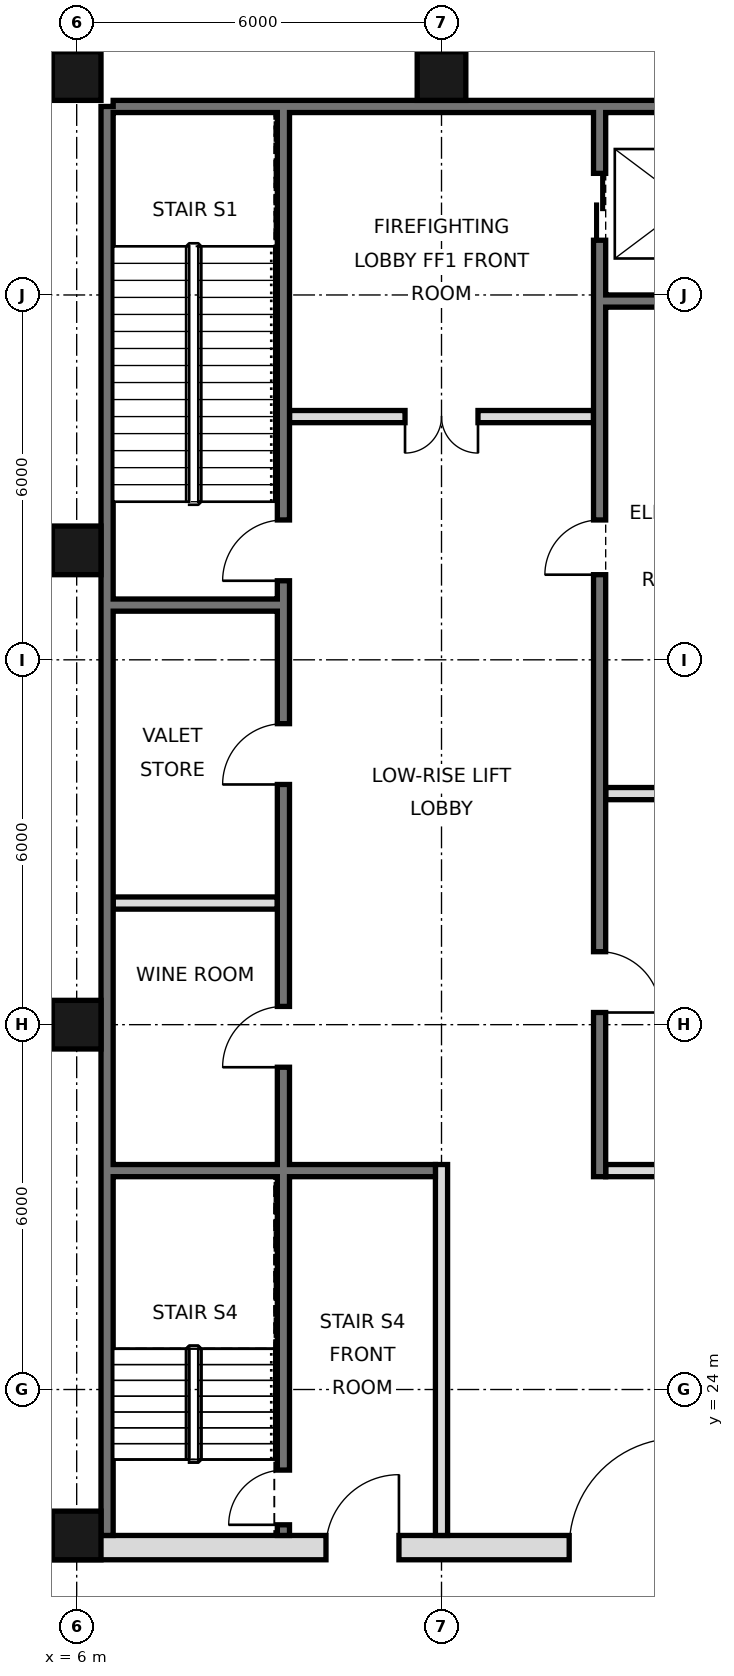
"""IFC4 building model, lengths in metres.
Left out: names, types, materials, properties, quantities, classifications, styles, units other than length and angle.
Written with IfcOpenShell. Run it as: python <this file> out.ifc"""

import sys

from ifc_helpers import new_model, si_unit, direction, frame, frame_2d, origin, origin_2d, place, context, subcontext, project, spatial, rectangle, hollow_rectangle, extrude, element, fill, save


model = new_model("IFC4")
c1 = context("Model", 3, precision=1e-05, world=origin(), true_north=direction((0.0, 1.0)))
c2 = subcontext(c1, "Body", "Model", "MODEL_VIEW")
j1 = project(units=[si_unit("LENGTHUNIT", "METRE"), si_unit("PLANEANGLEUNIT", "RADIAN")], contexts=[c1])
p1 = place(None, origin())
s1 = spatial("IfcSite", under=j1, at=p1, CompositionType="ELEMENT")
p2 = place(p1, origin())
s2 = spatial("IfcBuilding", under=s1, at=p2, CompositionType="ELEMENT")
p3 = place(p2, frame((0.0, 0.0, 257.6)))
s3 = spatial("IfcBuildingStorey", under=s2, at=p3, CompositionType="ELEMENT", Elevation=257.6)
for number, where, z_axis, x_axis in (
    (1, (6.0, 21.6, 0.0), (0.0, 0.0, 1.0), (1.0, 0.0, 0.0)),
    (2, (6.0, 30.0, 0.0), (0.0, 0.0, 1.0), (1.0, 0.0, 0.0)),
    (3, (6.0, 37.8, 0.0), (0.0, 0.0, 1.0), (1.0, 0.0, 0.0)),
    (4, (6.0, 45.6, 0.0), (0.0, 0.0, 1.0), (1.0, 0.0, 0.0)),
    (5, (12.0, 45.6, 0.0), (0.0, 0.0, 1.0), (1.0, 0.0, 0.0)),
):
    element("IfcColumn", number, at=place(p3, frame(where, z_axis=z_axis, x_axis=x_axis)), inside=s3, PredefinedType="COLUMN", context=c2, shape_type="SweptSolid", body=[
        extrude(hollow_rectangle(XDim=0.8, YDim=0.8, WallThickness=0.032, at=origin_2d()), origin(), (0.0, 0.0, 1.0), 5.4),
    ])
p4 = place(p3, frame((6.5, 21.6, 0.0), z_axis=(0.0, 0.0, 1.0), x_axis=(0.0, 1.0, 0.0)))
e6 = element("IfcWall", 6, at=p4, inside=s3, PredefinedType="SOLIDWALL", context=c2, shape_type="SweptSolid", body=[
    extrude(rectangle(XDim=23.5, YDim=0.2, at=frame_2d((11.75, 0.0))), origin(), (0.0, 0.0, 1.0), 5.22),
])
p5 = place(p3, frame((6.6, 45.1, 0.0), z_axis=(0.0, 0.0, 1.0), x_axis=(1.0, 0.0, 0.0)))
e7 = element("IfcWall", 7, at=p5, inside=s3, PredefinedType="SOLIDWALL", context=c2, shape_type="SweptSolid", body=[
    extrude(rectangle(XDim=34.8, YDim=0.2, at=frame_2d((17.4, 0.0))), origin(), (0.0, 0.0, 1.0), 5.22),
])
p6 = place(p3, frame((5.6, 21.4, 0.0), z_axis=(0.0, 0.0, 1.0), x_axis=(1.0, 0.0, 0.0)))
e8 = element("IfcWall", 8, at=p6, inside=s3, PredefinedType="SOLIDWALL", context=c2, shape_type="SweptSolid", body=[
    extrude(rectangle(XDim=36.8, YDim=0.4, at=frame_2d((18.4, 0.0))), origin(), (0.0, 0.0, 1.0), 5.22),
])
p7 = place(p6, frame((8.5, 0.0, 0.0)))
e9 = element("IfcOpeningElement", 9, at=p7, cuts=e8, PredefinedType="OPENING", context=c2, shape_type="SweptSolid", body=[
    extrude(rectangle(XDim=1.8, YDim=2.1, at=frame_2d((0.9, 1.05))), frame((0.0, 0.21, 0.0), z_axis=(0.0, -1.0, 0.0), x_axis=(1.0, 0.0, 0.0)), (0.0, 0.0, 1.0), 0.42),
])
p8 = place(p6, frame((17.5, 0.0, 0.0)))
e10 = element("IfcOpeningElement", 10, at=p8, cuts=e8, PredefinedType="OPENING", context=c2, shape_type="SweptSolid", body=[
    extrude(rectangle(XDim=1.8, YDim=2.1, at=frame_2d((0.9, 1.05))), frame((0.0, 0.21, 0.0), z_axis=(0.0, -1.0, 0.0), x_axis=(1.0, 0.0, 0.0)), (0.0, 0.0, 1.0), 0.42),
])
p9 = place(p6, frame((26.5, 0.0, 0.0)))
e11 = element("IfcOpeningElement", 11, at=p9, cuts=e8, PredefinedType="OPENING", context=c2, shape_type="SweptSolid", body=[
    extrude(rectangle(XDim=1.8, YDim=2.1, at=frame_2d((0.9, 1.05))), frame((0.0, 0.21, 0.0), z_axis=(0.0, -1.0, 0.0), x_axis=(1.0, 0.0, 0.0)), (0.0, 0.0, 1.0), 0.42),
])
p10 = place(p6, frame((4.5, 0.0, 0.0)))
e12 = element("IfcOpeningElement", 12, at=p10, cuts=e8, PredefinedType="OPENING", context=c2, shape_type="SweptSolid", body=[
    extrude(rectangle(XDim=1.2, YDim=2.1, at=frame_2d((0.6, 1.05))), frame((0.0, 0.21, 0.0), z_axis=(0.0, -1.0, 0.0), x_axis=(1.0, 0.0, 0.0)), (0.0, 0.0, 1.0), 0.42),
])
p11 = place(p6, frame((31.1, 0.0, 0.0)))
e13 = element("IfcOpeningElement", 13, at=p11, cuts=e8, PredefinedType="OPENING", context=c2, shape_type="SweptSolid", body=[
    extrude(rectangle(XDim=1.2, YDim=2.1, at=frame_2d((0.6, 1.05))), frame((0.0, 0.21, 0.0), z_axis=(0.0, -1.0, 0.0), x_axis=(1.0, 0.0, 0.0)), (0.0, 0.0, 1.0), 0.42),
])
p12 = place(p3, frame((12.0, 21.6, 0.0), z_axis=(0.0, 0.0, 1.0), x_axis=(0.0, 1.0, 0.0)))
e14 = element("IfcWall", 14, at=p12, inside=s3, PredefinedType="PARTITIONING", context=c2, shape_type="SweptSolid", body=[
    extrude(rectangle(XDim=6.1, YDim=0.2, at=frame_2d((3.05, 0.0))), origin(), (0.0, 0.0, 1.0), 5.22),
])
p13 = place(p3, frame((14.6, 27.5, 0.0), z_axis=(0.0, 0.0, 1.0), x_axis=(0.0, 1.0, 0.0)))
e15 = element("IfcWall", 15, at=p13, inside=s3, PredefinedType="SOLIDWALL", context=c2, shape_type="SweptSolid", body=[
    extrude(rectangle(XDim=17.5, YDim=0.2, at=frame_2d((8.75, 0.0))), origin(), (0.0, 0.0, 1.0), 5.22),
])
p14 = place(p13, frame((15.4, 0.0, 0.0)))
e16 = element("IfcOpeningElement", 16, at=p14, cuts=e15, PredefinedType="OPENING", context=c2, shape_type="SweptSolid", body=[
    extrude(rectangle(XDim=1.1, YDim=2.1, at=frame_2d((0.55, 1.05))), frame((0.0, 0.11, 0.0), z_axis=(0.0, -1.0, 0.0), x_axis=(1.0, 0.0, 0.0)), (0.0, 0.0, 1.0), 0.22),
])
p15 = place(p13, frame((2.7, 0.0, 0.0)))
e17 = element("IfcOpeningElement", 17, at=p15, cuts=e15, PredefinedType="OPENING", context=c2, shape_type="SweptSolid", body=[
    extrude(rectangle(XDim=1.0, YDim=2.1, at=frame_2d((0.5, 1.05))), frame((0.0, 0.11, 0.0), z_axis=(0.0, -1.0, 0.0), x_axis=(1.0, 0.0, 0.0)), (0.0, 0.0, 1.0), 0.22),
])
p16 = place(p13, frame((9.9, 0.0, 0.0)))
e18 = element("IfcOpeningElement", 18, at=p16, cuts=e15, PredefinedType="OPENING", context=c2, shape_type="SweptSolid", body=[
    extrude(rectangle(XDim=0.9, YDim=2.1, at=frame_2d((0.45, 1.05))), frame((0.0, 0.11, 0.0), z_axis=(0.0, -1.0, 0.0), x_axis=(1.0, 0.0, 0.0)), (0.0, 0.0, 1.0), 0.22),
])
p17 = place(p3, frame((9.4, 21.6, 0.0), z_axis=(0.0, 0.0, 1.0), x_axis=(0.0, 1.0, 0.0)))
e19 = element("IfcWall", 19, at=p17, inside=s3, PredefinedType="SOLIDWALL", context=c2, shape_type="SweptSolid", body=[
    extrude(rectangle(XDim=23.4, YDim=0.2, at=frame_2d((11.7, 0.0))), origin(), (0.0, 0.0, 1.0), 5.22),
])
p18 = place(p17, frame((7.7, 0.0, 0.0)))
e20 = element("IfcOpeningElement", 20, at=p18, cuts=e19, PredefinedType="OPENING", context=c2, shape_type="SweptSolid", body=[
    extrude(rectangle(XDim=1.0, YDim=2.1, at=frame_2d((0.5, 1.05))), frame((0.0, 0.11, 0.0), z_axis=(0.0, -1.0, 0.0), x_axis=(1.0, 0.0, 0.0)), (0.0, 0.0, 1.0), 0.22),
])
p19 = place(p17, frame((12.35, 0.0, 0.0)))
e21 = element("IfcOpeningElement", 21, at=p19, cuts=e19, PredefinedType="OPENING", context=c2, shape_type="SweptSolid", body=[
    extrude(rectangle(XDim=1.0, YDim=2.1, at=frame_2d((0.5, 1.05))), frame((0.0, 0.11, 0.0), z_axis=(0.0, -1.0, 0.0), x_axis=(1.0, 0.0, 0.0)), (0.0, 0.0, 1.0), 0.22),
])
p20 = place(p17, frame((15.7, 0.0, 0.0)))
e22 = element("IfcOpeningElement", 22, at=p20, cuts=e19, PredefinedType="OPENING", context=c2, shape_type="SweptSolid", body=[
    extrude(rectangle(XDim=1.0, YDim=2.1, at=frame_2d((0.5, 1.05))), frame((0.0, 0.11, 0.0), z_axis=(0.0, -1.0, 0.0), x_axis=(1.0, 0.0, 0.0)), (0.0, 0.0, 1.0), 0.22),
])
p21 = place(p17, frame((0.175, 0.0, 0.0)))
e23 = element("IfcOpeningElement", 23, at=p21, cuts=e19, PredefinedType="OPENING", context=c2, shape_type="SweptSolid", body=[
    extrude(rectangle(XDim=0.9, YDim=2.1, at=frame_2d((0.45, 1.05))), frame((0.0, 0.11, 0.0), z_axis=(0.0, -1.0, 0.0), x_axis=(1.0, 0.0, 0.0)), (0.0, 0.0, 1.0), 0.22),
])
p22 = place(p3, frame((14.7, 27.6, 0.0), z_axis=(0.0, 0.0, 1.0), x_axis=(1.0, 0.0, 0.0)))
e24 = element("IfcWall", 24, at=p22, inside=s3, PredefinedType="PARTITIONING", context=c2, shape_type="SweptSolid", body=[
    extrude(rectangle(XDim=2.7, YDim=0.2, at=frame_2d((1.35, 0.0))), origin(), (0.0, 0.0, 1.0), 5.22),
])
p23 = place(p3, frame((6.6, 27.6, 0.0), z_axis=(0.0, 0.0, 1.0), x_axis=(1.0, 0.0, 0.0)))
e25 = element("IfcWall", 25, at=p23, inside=s3, PredefinedType="SOLIDWALL", context=c2, shape_type="SweptSolid", body=[
    extrude(rectangle(XDim=5.3, YDim=0.2, at=frame_2d((2.65, 0.0))), origin(), (0.0, 0.0, 1.0), 5.22),
])
p24 = place(p3, frame((6.6, 32.0, 0.0), z_axis=(0.0, 0.0, 1.0), x_axis=(1.0, 0.0, 0.0)))
e26 = element("IfcWall", 26, at=p24, inside=s3, PredefinedType="PARTITIONING", context=c2, shape_type="SweptSolid", body=[
    extrude(rectangle(XDim=2.7, YDim=0.2, at=frame_2d((1.35, 0.0))), origin(), (0.0, 0.0, 1.0), 5.22),
])
for number, where, z_axis, x_axis in (
    (27, (14.7, 33.8, 0.0), (0.0, 0.0, 1.0), (1.0, 0.0, 0.0)),
    (28, (6.6, 36.9, 0.0), (0.0, 0.0, 1.0), (1.0, 0.0, 0.0)),
):
    element("IfcWall", number, at=place(p3, frame(where, z_axis=z_axis, x_axis=x_axis)), inside=s3, PredefinedType="SOLIDWALL", context=c2, shape_type="SweptSolid", body=[
        extrude(rectangle(XDim=2.7, YDim=0.2, at=frame_2d((1.35, 0.0))), origin(), (0.0, 0.0, 1.0), 5.22),
    ])
p25 = place(p3, frame((9.5, 40.0, 0.0), z_axis=(0.0, 0.0, 1.0), x_axis=(1.0, 0.0, 0.0)))
e29 = element("IfcWall", 29, at=p25, inside=s3, PredefinedType="PARTITIONING", context=c2, shape_type="SweptSolid", body=[
    extrude(rectangle(XDim=5.0, YDim=0.2, at=frame_2d((2.5, 0.0))), origin(), (0.0, 0.0, 1.0), 5.22),
])
p26 = place(p25, frame((1.9, 0.0, 0.0)))
e30 = element("IfcOpeningElement", 30, at=p26, cuts=e29, PredefinedType="OPENING", context=c2, shape_type="SweptSolid", body=[
    extrude(rectangle(XDim=1.2, YDim=2.1, at=frame_2d((0.6, 1.05))), frame((0.0, 0.11, 0.0), z_axis=(0.0, -1.0, 0.0), x_axis=(1.0, 0.0, 0.0)), (0.0, 0.0, 1.0), 0.22),
])
p27 = place(p3, frame((14.7, 41.9, 0.0), z_axis=(0.0, 0.0, 1.0), x_axis=(1.0, 0.0, 0.0)))
e31 = element("IfcWall", 31, at=p27, inside=s3, PredefinedType="SOLIDWALL", context=c2, shape_type="SweptSolid", body=[
    extrude(rectangle(XDim=2.7, YDim=0.2, at=frame_2d((1.35, 0.0))), origin(), (0.0, 0.0, 1.0), 5.22),
])
p28 = place(p7, frame((1.8, 0.0, 0.0), z_axis=(0.0, 0.0, 1.0), x_axis=(-1.0, 0.0, 0.0)))
e32 = element("IfcDoor", 32, at=p28, inside=s3, OperationType="SINGLE_SWING_LEFT", PredefinedType="DOOR", context=c2, shape_type="SweptSolid", body=[
    extrude(rectangle(XDim=1.8, YDim=2.1, at=frame_2d((0.9, 1.05))), frame((0.0, 0.025, 0.0), z_axis=(0.0, -1.0, 0.0), x_axis=(1.0, 0.0, 0.0)), (0.0, 0.0, 1.0), 0.05),
])
fill(e9, e32)
p29 = place(p10, frame((1.2, 0.0, 0.0), z_axis=(0.0, 0.0, 1.0), x_axis=(-1.0, 0.0, 0.0)))
e33 = element("IfcDoor", 33, at=p29, inside=s3, OperationType="SINGLE_SWING_LEFT", PredefinedType="DOOR", context=c2, shape_type="SweptSolid", body=[
    extrude(rectangle(XDim=1.2, YDim=2.1, at=frame_2d((0.6, 1.05))), frame((0.0, 0.025, 0.0), z_axis=(0.0, -1.0, 0.0), x_axis=(1.0, 0.0, 0.0)), (0.0, 0.0, 1.0), 0.05),
])
fill(e12, e33)
p30 = place(p26, frame((1.2, 0.0, 0.0), z_axis=(0.0, 0.0, 1.0), x_axis=(-1.0, 0.0, 0.0)))
e34 = element("IfcDoor", 34, at=p30, inside=s3, OperationType="DOUBLE_DOOR_SINGLE_SWING", PredefinedType="DOOR", context=c2, shape_type="SweptSolid", body=[
    extrude(rectangle(XDim=1.2, YDim=2.1, at=frame_2d((0.6, 1.05))), frame((0.0, 0.025, 0.0), z_axis=(0.0, -1.0, 0.0), x_axis=(1.0, 0.0, 0.0)), (0.0, 0.0, 1.0), 0.05),
])
fill(e30, e34)
p31 = place(p14, origin())
e35 = element("IfcDoor", 35, at=p31, inside=s3, OperationType="DOUBLE_DOOR_SLIDING", PredefinedType="DOOR", context=c2, shape_type="SweptSolid", body=[
    extrude(rectangle(XDim=1.1, YDim=2.1, at=frame_2d((0.55, 1.05))), frame((0.0, 0.025, 0.0), z_axis=(0.0, -1.0, 0.0), x_axis=(1.0, 0.0, 0.0)), (0.0, 0.0, 1.0), 0.05),
])
fill(e16, e35)
p32 = place(p15, frame((1.0, 0.0, 0.0), z_axis=(0.0, 0.0, 1.0), x_axis=(-1.0, 0.0, 0.0)))
e36 = element("IfcDoor", 36, at=p32, inside=s3, OperationType="SINGLE_SWING_RIGHT", PredefinedType="DOOR", context=c2, shape_type="SweptSolid", body=[
    extrude(rectangle(XDim=1.0, YDim=2.1, at=frame_2d((0.5, 1.05))), frame((0.0, 0.025, 0.0), z_axis=(0.0, -1.0, 0.0), x_axis=(1.0, 0.0, 0.0)), (0.0, 0.0, 1.0), 0.05),
])
fill(e17, e36)
p33 = place(p18, origin())
e37 = element("IfcDoor", 37, at=p33, inside=s3, OperationType="SINGLE_SWING_LEFT", PredefinedType="DOOR", context=c2, shape_type="SweptSolid", body=[
    extrude(rectangle(XDim=1.0, YDim=2.1, at=frame_2d((0.5, 1.05))), frame((0.0, 0.025, 0.0), z_axis=(0.0, -1.0, 0.0), x_axis=(1.0, 0.0, 0.0)), (0.0, 0.0, 1.0), 0.05),
])
fill(e20, e37)
p34 = place(p19, origin())
e38 = element("IfcDoor", 38, at=p34, inside=s3, OperationType="SINGLE_SWING_LEFT", PredefinedType="DOOR", context=c2, shape_type="SweptSolid", body=[
    extrude(rectangle(XDim=1.0, YDim=2.1, at=frame_2d((0.5, 1.05))), frame((0.0, 0.025, 0.0), z_axis=(0.0, -1.0, 0.0), x_axis=(1.0, 0.0, 0.0)), (0.0, 0.0, 1.0), 0.05),
])
fill(e21, e38)
p35 = place(p20, origin())
e39 = element("IfcDoor", 39, at=p35, inside=s3, OperationType="SINGLE_SWING_LEFT", PredefinedType="DOOR", context=c2, shape_type="SweptSolid", body=[
    extrude(rectangle(XDim=1.0, YDim=2.1, at=frame_2d((0.5, 1.05))), frame((0.0, 0.025, 0.0), z_axis=(0.0, -1.0, 0.0), x_axis=(1.0, 0.0, 0.0)), (0.0, 0.0, 1.0), 0.05),
])
fill(e22, e39)
p36 = place(p21, origin())
e40 = element("IfcDoor", 40, at=p36, inside=s3, OperationType="SINGLE_SWING_LEFT", PredefinedType="DOOR", context=c2, shape_type="SweptSolid", body=[
    extrude(rectangle(XDim=0.9, YDim=2.1, at=frame_2d((0.45, 1.05))), frame((0.0, 0.025, 0.0), z_axis=(0.0, -1.0, 0.0), x_axis=(1.0, 0.0, 0.0)), (0.0, 0.0, 1.0), 0.05),
])
fill(e23, e40)
p37 = place(p16, origin())
e41 = element("IfcDoor", 41, at=p37, inside=s3, OperationType="SINGLE_SWING_LEFT", PredefinedType="DOOR", context=c2, shape_type="SweptSolid", body=[
    extrude(rectangle(XDim=0.9, YDim=2.1, at=frame_2d((0.45, 1.05))), frame((0.0, 0.025, 0.0), z_axis=(0.0, -1.0, 0.0), x_axis=(1.0, 0.0, 0.0)), (0.0, 0.0, 1.0), 0.05),
])
fill(e18, e41)
save(model, sys.argv[1])
